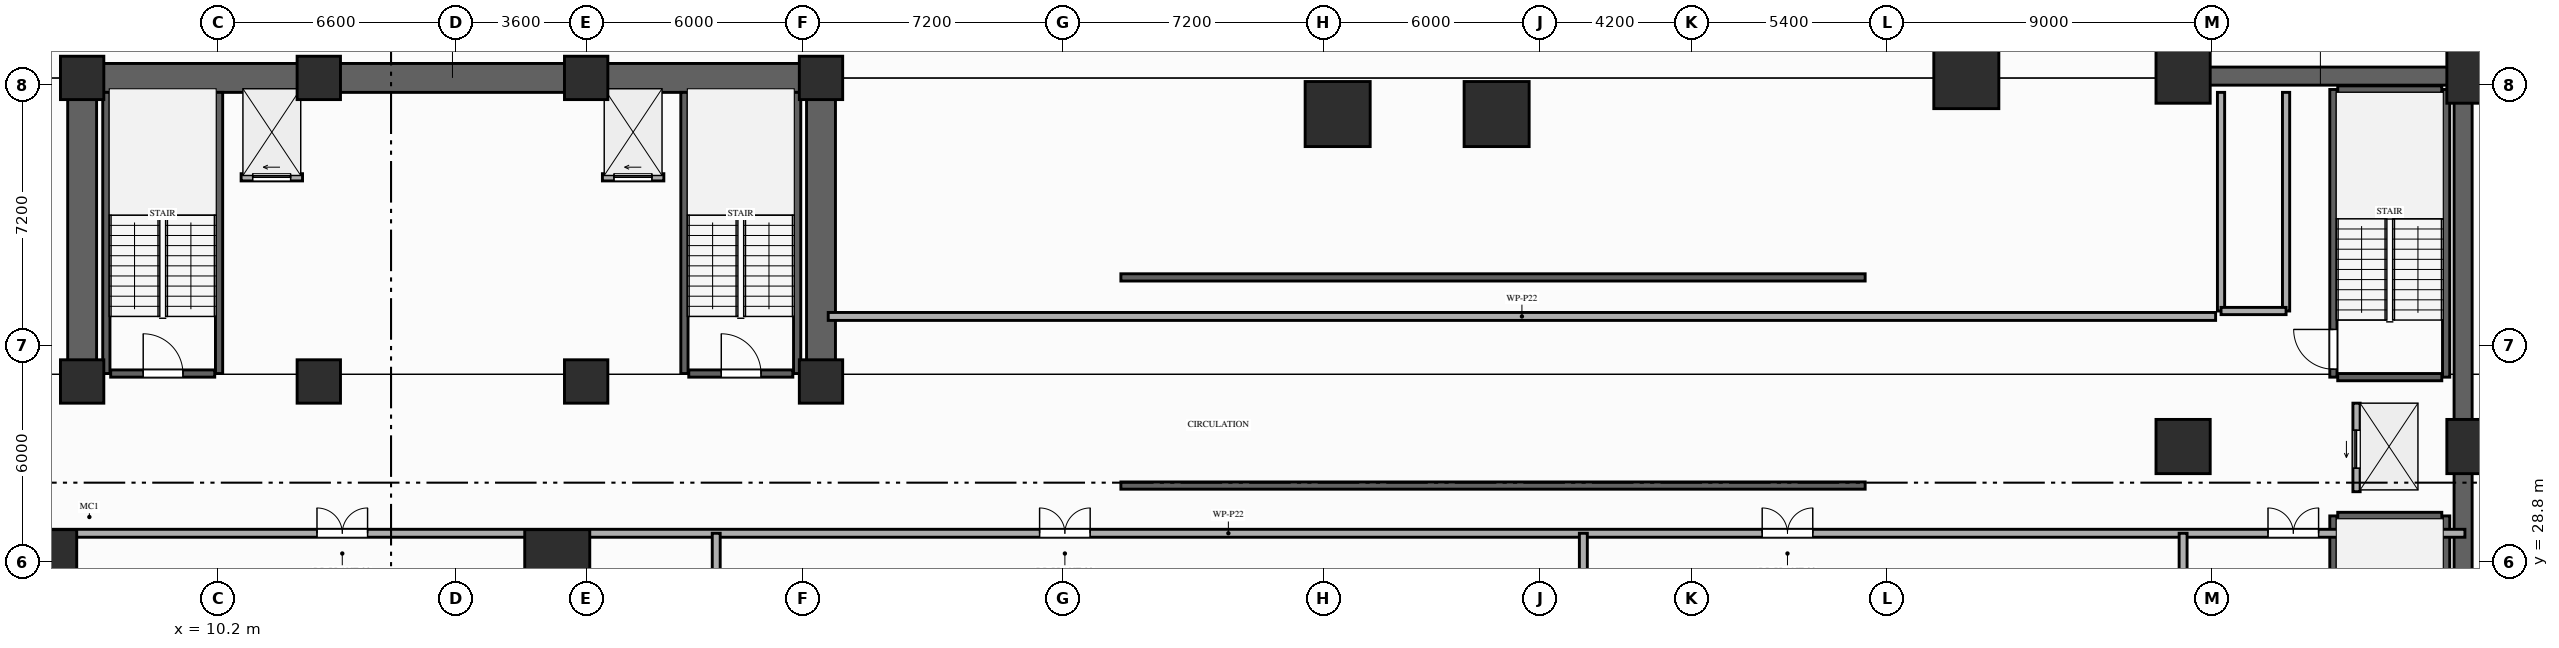
"""IFC4 building model, lengths in metres.
Left out: names, types, materials, properties, quantities, classifications, styles, units other than length and angle.
Written with IfcOpenShell. Run it as: python <this file> out.ifc"""

import sys

from ifc_helpers import new_model, si_unit, direction, frame, frame_2d, origin, origin_2d, place, context, subcontext, project, spatial, rectangle, extrude, element, fill, save


model = new_model("IFC4")
c1 = context("Model", 3, precision=1e-05, world=origin(), true_north=direction((0.0, 1.0)))
c2 = subcontext(c1, "Body", "Model", "MODEL_VIEW")
j1 = project(units=[si_unit("LENGTHUNIT", "METRE"), si_unit("PLANEANGLEUNIT", "RADIAN")], contexts=[c1])
p1 = place(None, origin())
s1 = spatial("IfcSite", under=j1, at=p1, CompositionType="ELEMENT")
p2 = place(p1, origin())
s2 = spatial("IfcBuilding", under=s1, at=p2, CompositionType="ELEMENT")
p3 = place(p2, frame((0.0, 0.0, -11.4)))
s3 = spatial("IfcBuildingStorey", under=s2, at=p3, CompositionType="ELEMENT", Elevation=-11.4)
for number, where, z_axis, x_axis in (
    (1, (6.45, 33.8, 0.0), (0.0, 0.0, 1.0), (1.0, 0.0, 0.0)),
    (2, (13.0, 33.8, 0.0), (0.0, 0.0, 1.0), (1.0, 0.0, 0.0)),
    (3, (20.4, 33.8, 0.0), (0.0, 0.0, 1.0), (1.0, 0.0, 0.0)),
    (4, (26.9, 33.8, 0.0), (0.0, 0.0, 1.0), (1.0, 0.0, 0.0)),
    (5, (6.45, 42.2, 0.0), (0.0, 0.0, 1.0), (1.0, 0.0, 0.0)),
    (6, (13.0, 42.2, 0.0), (0.0, 0.0, 1.0), (1.0, 0.0, 0.0)),
    (7, (20.4, 42.2, 0.0), (0.0, 0.0, 1.0), (1.0, 0.0, 0.0)),
    (8, (26.9, 42.2, 0.0), (0.0, 0.0, 1.0), (1.0, 0.0, 0.0)),
):
    element("IfcColumn", number, at=place(p3, frame(where, z_axis=z_axis, x_axis=x_axis)), inside=s3, PredefinedType="COLUMN", context=c2, shape_type="SweptSolid", body=[
        extrude(rectangle(XDim=1.2, YDim=1.2, at=origin_2d()), origin(), (0.0, 0.0, 1.0), 3.8),
    ])
for number, where, z_axis, x_axis in (
    (9, (64.6, 32.0, 0.0), (0.0, 0.0, 1.0), (1.0, 0.0, 0.0)),
    (10, (72.65, 32.0, 0.0), (0.0, 0.0, 1.0), (1.0, 0.0, 0.0)),
    (11, (64.6, 42.25, 0.0), (0.0, 0.0, 1.0), (1.0, 0.0, 0.0)),
    (12, (72.65, 42.25, 0.0), (0.0, 0.0, 1.0), (1.0, 0.0, 0.0)),
):
    element("IfcColumn", number, at=place(p3, frame(where, z_axis=z_axis, x_axis=x_axis)), inside=s3, PredefinedType="COLUMN", context=c2, shape_type="SweptSolid", body=[
        extrude(rectangle(XDim=1.5, YDim=1.5, at=origin_2d()), origin(), (0.0, 0.0, 1.0), 3.8),
    ])
for number, where, z_axis, x_axis in (
    (13, (5.4, 28.8, 0.0), (0.0, 0.0, 1.0), (1.0, 0.0, 0.0)),
    (14, (19.6, 28.8, 0.0), (0.0, 0.0, 1.0), (1.0, 0.0, 0.0)),
    (15, (41.2, 41.2, 0.0), (0.0, 0.0, 1.0), (1.0, 0.0, 0.0)),
    (16, (45.6, 41.2, 0.0), (0.0, 0.0, 1.0), (1.0, 0.0, 0.0)),
    (17, (58.6, 42.25, 0.0), (0.0, 0.0, 1.0), (1.0, 0.0, 0.0)),
):
    element("IfcColumn", number, at=place(p3, frame(where, z_axis=z_axis, x_axis=x_axis)), inside=s3, PredefinedType="COLUMN", context=c2, shape_type="SweptSolid", body=[
        extrude(rectangle(XDim=1.8, YDim=1.8, at=origin_2d()), origin(), (0.0, 0.0, 1.0), 3.8),
    ])
p4 = place(p3, frame((6.45, 42.2, 0.0), z_axis=(0.0, 0.0, 1.0), x_axis=(1.0, 0.0, 0.0)))
e18 = element("IfcWall", 18, at=p4, inside=s3, PredefinedType="SHEAR", context=c2, shape_type="SweptSolid", body=[
    extrude(rectangle(XDim=20.45, YDim=0.8, at=frame_2d((10.225, 0.0))), origin(), (0.0, 0.0, 1.0), 3.55),
])
for number, where, z_axis, x_axis in (
    (19, (6.45, 33.8, 0.0), (0.0, 0.0, 1.0), (0.0, 1.0, 0.0)),
    (20, (26.9, 33.8, 0.0), (0.0, 0.0, 1.0), (0.0, 1.0, 0.0)),
):
    element("IfcWall", number, at=place(p3, frame(where, z_axis=z_axis, x_axis=x_axis)), inside=s3, PredefinedType="SHEAR", context=c2, shape_type="SweptSolid", body=[
        extrude(rectangle(XDim=7.95, YDim=0.8, at=frame_2d((3.975, 0.0))), origin(), (0.0, 0.0, 1.0), 3.55),
    ])
p5 = place(p3, frame((72.35, 22.0, 0.0), z_axis=(0.0, 0.0, 1.0), x_axis=(0.0, 1.0, 0.0)))
e21 = element("IfcWall", 21, at=p5, inside=s3, PredefinedType="SHEAR", context=c2, shape_type="SweptSolid", body=[
    extrude(rectangle(XDim=20.25, YDim=0.5, at=frame_2d((10.125, 0.0))), origin(), (0.0, 0.0, 1.0), 3.55),
])
p6 = place(p3, frame((64.6, 42.25, 0.0), z_axis=(0.0, 0.0, 1.0), x_axis=(1.0, 0.0, 0.0)))
e22 = element("IfcWall", 22, at=p6, inside=s3, PredefinedType="SHEAR", context=c2, shape_type="SweptSolid", body=[
    extrude(rectangle(XDim=7.5, YDim=0.5, at=frame_2d((3.75, 0.0))), origin(), (0.0, 0.0, 1.0), 3.55),
])
for number, where, z_axis, x_axis in (
    (23, (7.12, 34.02, 0.0), (0.0, 0.0, 1.0), (0.0, 1.0, 0.0)),
    (24, (10.24, 34.02, 0.0), (0.0, 0.0, 1.0), (0.0, 1.0, 0.0)),
):
    element("IfcWall", number, at=place(p3, frame(where, z_axis=z_axis, x_axis=x_axis)), inside=s3, PredefinedType="SHEAR", context=c2, shape_type="SweptSolid", body=[
        extrude(rectangle(XDim=7.78, YDim=0.2, at=frame_2d((3.89, 0.0))), origin(), (0.0, 0.0, 1.0), 3.55),
    ])
p7 = place(p3, frame((7.24, 34.02, 0.0), z_axis=(0.0, 0.0, 1.0), x_axis=(1.0, 0.0, 0.0)))
e25 = element("IfcWall", 25, at=p7, inside=s3, PredefinedType="SHEAR", context=c2, shape_type="SweptSolid", body=[
    extrude(rectangle(XDim=2.88, YDim=0.2, at=frame_2d((1.44, 0.0))), origin(), (0.0, 0.0, 1.0), 3.55),
])
p8 = place(p7, frame((0.9, 0.0, 0.0)))
e26 = element("IfcOpeningElement", 26, at=p8, cuts=e25, PredefinedType="OPENING", context=c2, shape_type="SweptSolid", body=[
    extrude(rectangle(XDim=1.1, YDim=2.15, at=frame_2d((0.55, 1.075))), frame((0.0, 0.11, 0.0), z_axis=(0.0, -1.0, 0.0), x_axis=(1.0, 0.0, 0.0)), (0.0, 0.0, 1.0), 0.22),
])
for number, where, z_axis, x_axis in (
    (27, (23.12, 34.02, 0.0), (0.0, 0.0, 1.0), (0.0, 1.0, 0.0)),
    (28, (26.24, 34.02, 0.0), (0.0, 0.0, 1.0), (0.0, 1.0, 0.0)),
):
    element("IfcWall", number, at=place(p3, frame(where, z_axis=z_axis, x_axis=x_axis)), inside=s3, PredefinedType="SHEAR", context=c2, shape_type="SweptSolid", body=[
        extrude(rectangle(XDim=7.78, YDim=0.2, at=frame_2d((3.89, 0.0))), origin(), (0.0, 0.0, 1.0), 3.55),
    ])
p9 = place(p3, frame((23.24, 34.02, 0.0), z_axis=(0.0, 0.0, 1.0), x_axis=(1.0, 0.0, 0.0)))
e29 = element("IfcWall", 29, at=p9, inside=s3, PredefinedType="SHEAR", context=c2, shape_type="SweptSolid", body=[
    extrude(rectangle(XDim=2.88, YDim=0.2, at=frame_2d((1.44, 0.0))), origin(), (0.0, 0.0, 1.0), 3.55),
])
p10 = place(p9, frame((0.9, 0.0, 0.0)))
e30 = element("IfcOpeningElement", 30, at=p10, cuts=e29, PredefinedType="OPENING", context=c2, shape_type="SweptSolid", body=[
    extrude(rectangle(XDim=1.1, YDim=2.15, at=frame_2d((0.55, 1.075))), frame((0.0, 0.11, 0.0), z_axis=(0.0, -1.0, 0.0), x_axis=(1.0, 0.0, 0.0)), (0.0, 0.0, 1.0), 0.22),
])
p11 = place(p3, frame((68.76, 22.26, 0.0), z_axis=(0.0, 0.0, 1.0), x_axis=(0.0, 1.0, 0.0)))
e31 = element("IfcWall", 31, at=p11, inside=s3, PredefinedType="SHEAR", context=c2, shape_type="SweptSolid", body=[
    extrude(rectangle(XDim=7.82, YDim=0.2, at=frame_2d((3.91, 0.0))), origin(), (0.0, 0.0, 1.0), 3.55),
])
p12 = place(p11, frame((0.22, 0.0, 0.0)))
e32 = element("IfcOpeningElement", 32, at=p12, cuts=e31, PredefinedType="OPENING", context=c2, shape_type="SweptSolid", body=[
    extrude(rectangle(XDim=1.1, YDim=2.15, at=frame_2d((0.55, 1.075))), frame((0.0, 0.11, 0.0), z_axis=(0.0, -1.0, 0.0), x_axis=(1.0, 0.0, 0.0)), (0.0, 0.0, 1.0), 0.22),
])
p13 = place(p3, frame((71.88, 22.26, 0.0), z_axis=(0.0, 0.0, 1.0), x_axis=(0.0, 1.0, 0.0)))
e33 = element("IfcWall", 33, at=p13, inside=s3, PredefinedType="SHEAR", context=c2, shape_type="SweptSolid", body=[
    extrude(rectangle(XDim=7.82, YDim=0.2, at=frame_2d((3.91, 0.0))), origin(), (0.0, 0.0, 1.0), 3.55),
])
p14 = place(p3, frame((68.88, 30.08, 0.0), z_axis=(0.0, 0.0, 1.0), x_axis=(1.0, 0.0, 0.0)))
e34 = element("IfcWall", 34, at=p14, inside=s3, PredefinedType="SHEAR", context=c2, shape_type="SweptSolid", body=[
    extrude(rectangle(XDim=2.88, YDim=0.2, at=frame_2d((1.44, 0.0))), origin(), (0.0, 0.0, 1.0), 3.55),
])
p15 = place(p3, frame((68.76, 33.92, 0.0), z_axis=(0.0, 0.0, 1.0), x_axis=(0.0, 1.0, 0.0)))
e35 = element("IfcWall", 35, at=p15, inside=s3, PredefinedType="SHEAR", context=c2, shape_type="SweptSolid", body=[
    extrude(rectangle(XDim=7.96, YDim=0.2, at=frame_2d((3.98, 0.0))), origin(), (0.0, 0.0, 1.0), 3.55),
])
p16 = place(p15, frame((0.22, 0.0, 0.0)))
e36 = element("IfcOpeningElement", 36, at=p16, cuts=e35, PredefinedType="OPENING", context=c2, shape_type="SweptSolid", body=[
    extrude(rectangle(XDim=1.1, YDim=2.15, at=frame_2d((0.55, 1.075))), frame((0.0, 0.11, 0.0), z_axis=(0.0, -1.0, 0.0), x_axis=(1.0, 0.0, 0.0)), (0.0, 0.0, 1.0), 0.22),
])
p17 = place(p3, frame((71.88, 33.92, 0.0), z_axis=(0.0, 0.0, 1.0), x_axis=(0.0, 1.0, 0.0)))
e37 = element("IfcWall", 37, at=p17, inside=s3, PredefinedType="SHEAR", context=c2, shape_type="SweptSolid", body=[
    extrude(rectangle(XDim=7.96, YDim=0.2, at=frame_2d((3.98, 0.0))), origin(), (0.0, 0.0, 1.0), 3.55),
])
for number, where, z_axis, x_axis in (
    (38, (68.88, 41.88, 0.0), (0.0, 0.0, 1.0), (1.0, 0.0, 0.0)),
    (39, (68.88, 33.92, 0.0), (0.0, 0.0, 1.0), (1.0, 0.0, 0.0)),
):
    element("IfcWall", number, at=place(p3, frame(where, z_axis=z_axis, x_axis=x_axis)), inside=s3, PredefinedType="SHEAR", context=c2, shape_type="SweptSolid", body=[
        extrude(rectangle(XDim=2.88, YDim=0.2, at=frame_2d((1.44, 0.0))), origin(), (0.0, 0.0, 1.0), 3.55),
    ])
p18 = place(p3, frame((10.85, 39.45, 0.0), z_axis=(0.0, 0.0, 1.0), x_axis=(1.0, 0.0, 0.0)))
e40 = element("IfcWall", 40, at=p18, inside=s3, PredefinedType="MOVABLE", context=c2, shape_type="SweptSolid", body=[
    extrude(rectangle(XDim=1.7, YDim=0.2, at=frame_2d((0.85, 0.0))), origin(), (0.0, 0.0, 1.0), 3.55),
])
p19 = place(p18, frame((0.32, 0.0, 0.0)))
e41 = element("IfcOpeningElement", 41, at=p19, cuts=e40, PredefinedType="OPENING", context=c2, shape_type="SweptSolid", body=[
    extrude(rectangle(XDim=1.05, YDim=2.15, at=frame_2d((0.525, 1.075))), frame((0.0, 0.11, 0.0), z_axis=(0.0, -1.0, 0.0), x_axis=(1.0, 0.0, 0.0)), (0.0, 0.0, 1.0), 0.22),
])
p20 = place(p3, frame((20.85, 39.45, 0.0), z_axis=(0.0, 0.0, 1.0), x_axis=(1.0, 0.0, 0.0)))
e42 = element("IfcWall", 42, at=p20, inside=s3, PredefinedType="MOVABLE", context=c2, shape_type="SweptSolid", body=[
    extrude(rectangle(XDim=1.7, YDim=0.2, at=frame_2d((0.85, 0.0))), origin(), (0.0, 0.0, 1.0), 3.55),
])
p21 = place(p20, frame((0.32, 0.0, 0.0)))
e43 = element("IfcOpeningElement", 43, at=p21, cuts=e42, PredefinedType="OPENING", context=c2, shape_type="SweptSolid", body=[
    extrude(rectangle(XDim=1.05, YDim=2.15, at=frame_2d((0.525, 1.075))), frame((0.0, 0.11, 0.0), z_axis=(0.0, -1.0, 0.0), x_axis=(1.0, 0.0, 0.0)), (0.0, 0.0, 1.0), 0.22),
])
for number, where, z_axis, x_axis in (
    (44, (65.65, 35.75, 0.0), (0.0, 0.0, 1.0), (0.0, 1.0, 0.0)),
    (45, (67.45, 35.75, 0.0), (0.0, 0.0, 1.0), (0.0, 1.0, 0.0)),
):
    element("IfcWall", number, at=place(p3, frame(where, z_axis=z_axis, x_axis=x_axis)), inside=s3, PredefinedType="MOVABLE", context=c2, shape_type="SweptSolid", body=[
        extrude(rectangle(XDim=6.05, YDim=0.2, at=frame_2d((3.025, 0.0))), origin(), (0.0, 0.0, 1.0), 3.55),
    ])
p22 = place(p3, frame((65.65, 35.75, 0.0), z_axis=(0.0, 0.0, 1.0), x_axis=(1.0, 0.0, 0.0)))
e46 = element("IfcWall", 46, at=p22, inside=s3, PredefinedType="MOVABLE", context=c2, shape_type="SweptSolid", body=[
    extrude(rectangle(XDim=1.8, YDim=0.2, at=frame_2d((0.9, 0.0))), origin(), (0.0, 0.0, 1.0), 3.55),
])
p23 = place(p3, frame((69.4, 30.75, 0.0), z_axis=(0.0, 0.0, 1.0), x_axis=(0.0, 1.0, 0.0)))
e47 = element("IfcWall", 47, at=p23, inside=s3, PredefinedType="MOVABLE", context=c2, shape_type="SweptSolid", body=[
    extrude(rectangle(XDim=2.45, YDim=0.2, at=frame_2d((1.225, 0.0))), origin(), (0.0, 0.0, 1.0), 3.55),
])
p24 = place(p23, frame((0.65, 0.0, 0.0)))
e48 = element("IfcOpeningElement", 48, at=p24, cuts=e47, PredefinedType="OPENING", context=c2, shape_type="SweptSolid", body=[
    extrude(rectangle(XDim=1.05, YDim=2.15, at=frame_2d((0.525, 1.075))), frame((0.0, 0.11, 0.0), z_axis=(0.0, -1.0, 0.0), x_axis=(1.0, 0.0, 0.0)), (0.0, 0.0, 1.0), 0.22),
])
for number, where, z_axis, x_axis in (
    (49, (35.2, 30.92, 0.0), (0.0, 0.0, 1.0), (1.0, 0.0, 0.0)),
    (50, (35.2, 36.68, 0.0), (0.0, 0.0, 1.0), (1.0, 0.0, 0.0)),
):
    element("IfcWall", number, at=place(p3, frame(where, z_axis=z_axis, x_axis=x_axis)), inside=s3, PredefinedType="SHEAR", context=c2, shape_type="SweptSolid", body=[
        extrude(rectangle(XDim=20.6, YDim=0.2, at=frame_2d((10.3, 0.0))), origin(), (0.0, 0.0, 1.0), 3.55),
    ])
p25 = place(p3, frame((3.95, 29.6, 0.0), z_axis=(0.0, 0.0, 1.0), x_axis=(1.0, 0.0, 0.0)))
e51 = element("IfcWall", 51, at=p25, inside=s3, PredefinedType="PARTITIONING", context=c2, shape_type="SweptSolid", body=[
    extrude(rectangle(XDim=68.45, YDim=0.22, at=frame_2d((34.225, 0.0))), origin(), (0.0, 0.0, 1.0), 2.72),
])
p26 = place(p25, frame((9.0, 0.0, 0.0)))
e52 = element("IfcOpeningElement", 52, at=p26, cuts=e51, PredefinedType="OPENING", context=c2, shape_type="SweptSolid", body=[
    extrude(rectangle(XDim=1.4, YDim=2.2, at=frame_2d((0.7, 1.1))), frame((0.0, 0.12, 0.0), z_axis=(0.0, -1.0, 0.0), x_axis=(1.0, 0.0, 0.0)), (0.0, 0.0, 1.0), 0.24),
])
p27 = place(p25, frame((29.0, 0.0, 0.0)))
e53 = element("IfcOpeningElement", 53, at=p27, cuts=e51, PredefinedType="OPENING", context=c2, shape_type="SweptSolid", body=[
    extrude(rectangle(XDim=1.4, YDim=2.2, at=frame_2d((0.7, 1.1))), frame((0.0, 0.12, 0.0), z_axis=(0.0, -1.0, 0.0), x_axis=(1.0, 0.0, 0.0)), (0.0, 0.0, 1.0), 0.24),
])
p28 = place(p25, frame((49.0, 0.0, 0.0)))
e54 = element("IfcOpeningElement", 54, at=p28, cuts=e51, PredefinedType="OPENING", context=c2, shape_type="SweptSolid", body=[
    extrude(rectangle(XDim=1.4, YDim=2.2, at=frame_2d((0.7, 1.1))), frame((0.0, 0.12, 0.0), z_axis=(0.0, -1.0, 0.0), x_axis=(1.0, 0.0, 0.0)), (0.0, 0.0, 1.0), 0.24),
])
p29 = place(p25, frame((63.0, 0.0, 0.0)))
e55 = element("IfcOpeningElement", 55, at=p29, cuts=e51, PredefinedType="OPENING", context=c2, shape_type="SweptSolid", body=[
    extrude(rectangle(XDim=1.4, YDim=2.2, at=frame_2d((0.7, 1.1))), frame((0.0, 0.12, 0.0), z_axis=(0.0, -1.0, 0.0), x_axis=(1.0, 0.0, 0.0)), (0.0, 0.0, 1.0), 0.24),
])
p30 = place(p3, frame((27.1, 35.6, 0.0), z_axis=(0.0, 0.0, 1.0), x_axis=(1.0, 0.0, 0.0)))
e56 = element("IfcWall", 56, at=p30, inside=s3, PredefinedType="PARTITIONING", context=c2, shape_type="SweptSolid", body=[
    extrude(rectangle(XDim=38.4, YDim=0.22, at=frame_2d((19.2, 0.0))), origin(), (0.0, 0.0, 1.0), 2.72),
])
for number, where, z_axis, x_axis in (
    (57, (24.0, 1.7, 0.0), (0.0, 0.0, 1.0), (0.0, 1.0, 0.0)),
    (58, (48.0, 1.7, 0.0), (0.0, 0.0, 1.0), (0.0, 1.0, 0.0)),
    (59, (64.6, 1.7, 0.0), (0.0, 0.0, 1.0), (0.0, 1.0, 0.0)),
):
    element("IfcWall", number, at=place(p3, frame(where, z_axis=z_axis, x_axis=x_axis)), inside=s3, PredefinedType="PARTITIONING", context=c2, shape_type="SweptSolid", body=[
        extrude(rectangle(XDim=27.9, YDim=0.22, at=frame_2d((13.95, 0.0))), origin(), (0.0, 0.0, 1.0), 2.72),
    ])
p31 = place(p8, origin())
e60 = element("IfcDoor", 60, at=p31, inside=s3, OperationType="SINGLE_SWING_LEFT", PredefinedType="DOOR", context=c2, shape_type="SweptSolid", body=[
    extrude(rectangle(XDim=1.1, YDim=2.15, at=frame_2d((0.55, 1.075))), frame((0.0, 0.025, 0.0), z_axis=(0.0, -1.0, 0.0), x_axis=(1.0, 0.0, 0.0)), (0.0, 0.0, 1.0), 0.05),
])
fill(e26, e60)
p32 = place(p10, origin())
e61 = element("IfcDoor", 61, at=p32, inside=s3, OperationType="SINGLE_SWING_LEFT", PredefinedType="DOOR", context=c2, shape_type="SweptSolid", body=[
    extrude(rectangle(XDim=1.1, YDim=2.15, at=frame_2d((0.55, 1.075))), frame((0.0, 0.025, 0.0), z_axis=(0.0, -1.0, 0.0), x_axis=(1.0, 0.0, 0.0)), (0.0, 0.0, 1.0), 0.05),
])
fill(e30, e61)
p33 = place(p16, origin())
e62 = element("IfcDoor", 62, at=p33, inside=s3, OperationType="SINGLE_SWING_RIGHT", PredefinedType="DOOR", context=c2, shape_type="SweptSolid", body=[
    extrude(rectangle(XDim=1.1, YDim=2.15, at=frame_2d((0.55, 1.075))), frame((0.0, 0.025, 0.0), z_axis=(0.0, -1.0, 0.0), x_axis=(1.0, 0.0, 0.0)), (0.0, 0.0, 1.0), 0.05),
])
fill(e36, e62)
p34 = place(p19, origin())
e63 = element("IfcDoor", 63, at=p34, inside=s3, OperationType="SLIDING_TO_LEFT", PredefinedType="DOOR", context=c2, shape_type="SweptSolid", body=[
    extrude(rectangle(XDim=1.05, YDim=2.15, at=frame_2d((0.525, 1.075))), frame((0.0, 0.025, 0.0), z_axis=(0.0, -1.0, 0.0), x_axis=(1.0, 0.0, 0.0)), (0.0, 0.0, 1.0), 0.05),
])
fill(e41, e63)
p35 = place(p21, origin())
e64 = element("IfcDoor", 64, at=p35, inside=s3, OperationType="SLIDING_TO_LEFT", PredefinedType="DOOR", context=c2, shape_type="SweptSolid", body=[
    extrude(rectangle(XDim=1.05, YDim=2.15, at=frame_2d((0.525, 1.075))), frame((0.0, 0.025, 0.0), z_axis=(0.0, -1.0, 0.0), x_axis=(1.0, 0.0, 0.0)), (0.0, 0.0, 1.0), 0.05),
])
fill(e43, e64)
p36 = place(p24, origin())
e65 = element("IfcDoor", 65, at=p36, inside=s3, OperationType="SLIDING_TO_LEFT", PredefinedType="DOOR", context=c2, shape_type="SweptSolid", body=[
    extrude(rectangle(XDim=1.05, YDim=2.15, at=frame_2d((0.525, 1.075))), frame((0.0, 0.025, 0.0), z_axis=(0.0, -1.0, 0.0), x_axis=(1.0, 0.0, 0.0)), (0.0, 0.0, 1.0), 0.05),
])
fill(e48, e65)
p37 = place(p26, origin())
e66 = element("IfcDoor", 66, at=p37, inside=s3, OperationType="DOUBLE_DOOR_SINGLE_SWING", PredefinedType="DOOR", context=c2, shape_type="SweptSolid", body=[
    extrude(rectangle(XDim=1.4, YDim=2.2, at=frame_2d((0.7, 1.1))), frame((0.0, 0.025, 0.0), z_axis=(0.0, -1.0, 0.0), x_axis=(1.0, 0.0, 0.0)), (0.0, 0.0, 1.0), 0.05),
])
fill(e52, e66)
p38 = place(p27, origin())
e67 = element("IfcDoor", 67, at=p38, inside=s3, OperationType="DOUBLE_DOOR_SINGLE_SWING", PredefinedType="DOOR", context=c2, shape_type="SweptSolid", body=[
    extrude(rectangle(XDim=1.4, YDim=2.2, at=frame_2d((0.7, 1.1))), frame((0.0, 0.025, 0.0), z_axis=(0.0, -1.0, 0.0), x_axis=(1.0, 0.0, 0.0)), (0.0, 0.0, 1.0), 0.05),
])
fill(e53, e67)
p39 = place(p28, origin())
e68 = element("IfcDoor", 68, at=p39, inside=s3, OperationType="DOUBLE_DOOR_SINGLE_SWING", PredefinedType="DOOR", context=c2, shape_type="SweptSolid", body=[
    extrude(rectangle(XDim=1.4, YDim=2.2, at=frame_2d((0.7, 1.1))), frame((0.0, 0.025, 0.0), z_axis=(0.0, -1.0, 0.0), x_axis=(1.0, 0.0, 0.0)), (0.0, 0.0, 1.0), 0.05),
])
fill(e54, e68)
p40 = place(p29, origin())
e69 = element("IfcDoor", 69, at=p40, inside=s3, OperationType="DOUBLE_DOOR_SINGLE_SWING", PredefinedType="DOOR", context=c2, shape_type="SweptSolid", body=[
    extrude(rectangle(XDim=1.4, YDim=2.2, at=frame_2d((0.7, 1.1))), frame((0.0, 0.025, 0.0), z_axis=(0.0, -1.0, 0.0), x_axis=(1.0, 0.0, 0.0)), (0.0, 0.0, 1.0), 0.05),
])
fill(e55, e69)
save(model, sys.argv[1])
